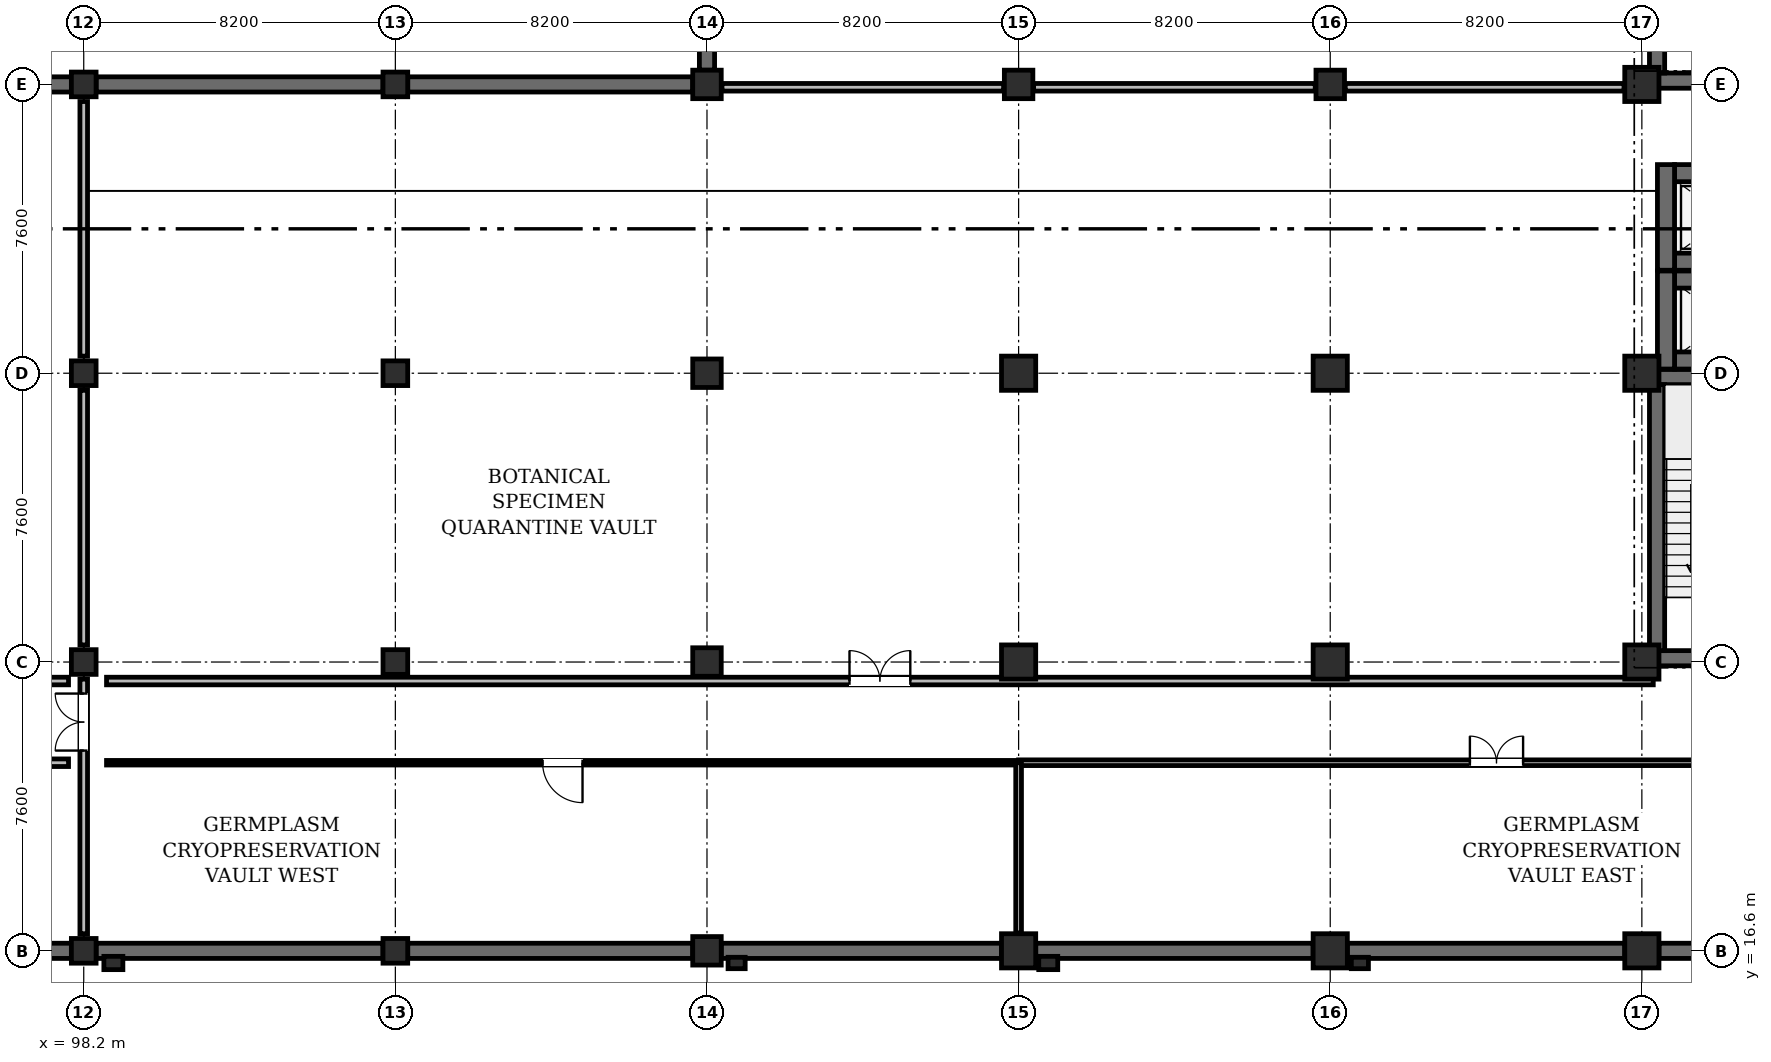
"""IFC4 building model, lengths in metres.
Left out: names, types, materials, properties, quantities, classifications, styles, units other than length and angle.
Written with IfcOpenShell. Run it as: python <this file> out.ifc"""

import sys

from ifc_helpers import new_model, si_unit, direction, frame, frame_2d, origin, origin_2d, place, context, subcontext, project, spatial, rectangle, extrude, element, fill, save


model = new_model("IFC4")
c1 = context("Model", 3, precision=1e-05, world=origin(), true_north=direction((0.0, 1.0)))
c2 = subcontext(c1, "Body", "Model", "MODEL_VIEW")
j1 = project(units=[si_unit("LENGTHUNIT", "METRE"), si_unit("PLANEANGLEUNIT", "RADIAN")], contexts=[c1])
p1 = place(None, origin())
s1 = spatial("IfcSite", under=j1, at=p1, CompositionType="ELEMENT")
p2 = place(p1, origin())
s2 = spatial("IfcBuilding", under=s1, at=p2, CompositionType="ELEMENT")
p3 = place(p2, frame((0.0, 0.0, -4.8)))
s3 = spatial("IfcBuildingStorey", under=s2, at=p3, CompositionType="ELEMENT", Elevation=-4.8)
for number, where, z_axis, x_axis in (
    (1, (98.2, 16.6, 0.0), (0.0, 0.0, 1.0), (1.0, 0.0, 0.0)),
    (2, (98.2, 24.2, 0.0), (0.0, 0.0, 1.0), (1.0, 0.0, 0.0)),
    (3, (98.2, 31.8, 0.0), (0.0, 0.0, 1.0), (1.0, 0.0, 0.0)),
    (4, (98.2, 39.4, 0.0), (0.0, 0.0, 1.0), (1.0, 0.0, 0.0)),
    (5, (106.4, 16.6, 0.0), (0.0, 0.0, 1.0), (1.0, 0.0, 0.0)),
    (6, (106.4, 24.2, 0.0), (0.0, 0.0, 1.0), (1.0, 0.0, 0.0)),
    (7, (106.4, 31.8, 0.0), (0.0, 0.0, 1.0), (1.0, 0.0, 0.0)),
    (8, (106.4, 39.4, 0.0), (0.0, 0.0, 1.0), (1.0, 0.0, 0.0)),
):
    element("IfcColumn", number, at=place(p3, frame(where, z_axis=z_axis, x_axis=x_axis)), inside=s3, PredefinedType="COLUMN", context=c2, shape_type="SweptSolid", body=[
        extrude(rectangle(XDim=0.65, YDim=0.65, at=origin_2d()), origin(), (0.0, 0.0, 1.0), 4.46),
    ])
for number, where, z_axis, x_axis in (
    (9, (114.6, 16.6, 0.0), (0.0, 0.0, 1.0), (1.0, 0.0, 0.0)),
    (10, (114.6, 24.2, 0.0), (0.0, 0.0, 1.0), (1.0, 0.0, 0.0)),
    (11, (114.6, 31.8, 0.0), (0.0, 0.0, 1.0), (1.0, 0.0, 0.0)),
    (12, (114.6, 39.4, 0.0), (0.0, 0.0, 1.0), (1.0, 0.0, 0.0)),
):
    element("IfcColumn", number, at=place(p3, frame(where, z_axis=z_axis, x_axis=x_axis)), inside=s3, PredefinedType="COLUMN", context=c2, shape_type="SweptSolid", body=[
        extrude(rectangle(XDim=0.75, YDim=0.75, at=origin_2d()), origin(), (0.0, 0.0, 1.0), 4.46),
    ])
for number, where, z_axis, x_axis in (
    (13, (122.8, 16.6, 0.0), (0.0, 0.0, 1.0), (1.0, 0.0, 0.0)),
    (14, (122.8, 24.2, 0.0), (0.0, 0.0, 1.0), (1.0, 0.0, 0.0)),
    (15, (122.8, 31.8, 0.0), (0.0, 0.0, 1.0), (1.0, 0.0, 0.0)),
):
    element("IfcColumn", number, at=place(p3, frame(where, z_axis=z_axis, x_axis=x_axis)), inside=s3, PredefinedType="COLUMN", context=c2, shape_type="SweptSolid", body=[
        extrude(rectangle(XDim=0.9, YDim=0.9, at=origin_2d()), origin(), (0.0, 0.0, 1.0), 4.46),
    ])
p4 = place(p3, frame((122.8, 39.4, 0.0), z_axis=(0.0, 0.0, 1.0), x_axis=(1.0, 0.0, 0.0)))
e16 = element("IfcColumn", 16, at=p4, inside=s3, PredefinedType="COLUMN", context=c2, shape_type="SweptSolid", body=[
    extrude(rectangle(XDim=0.75, YDim=0.75, at=origin_2d()), origin(), (0.0, 0.0, 1.0), 4.46),
])
for number, where, z_axis, x_axis in (
    (17, (131.0, 16.6, 0.0), (0.0, 0.0, 1.0), (1.0, 0.0, 0.0)),
    (18, (131.0, 24.2, 0.0), (0.0, 0.0, 1.0), (1.0, 0.0, 0.0)),
    (19, (131.0, 31.8, 0.0), (0.0, 0.0, 1.0), (1.0, 0.0, 0.0)),
):
    element("IfcColumn", number, at=place(p3, frame(where, z_axis=z_axis, x_axis=x_axis)), inside=s3, PredefinedType="COLUMN", context=c2, shape_type="SweptSolid", body=[
        extrude(rectangle(XDim=0.9, YDim=0.9, at=origin_2d()), origin(), (0.0, 0.0, 1.0), 4.46),
    ])
p5 = place(p3, frame((131.0, 39.4, 0.0), z_axis=(0.0, 0.0, 1.0), x_axis=(1.0, 0.0, 0.0)))
e20 = element("IfcColumn", 20, at=p5, inside=s3, PredefinedType="COLUMN", context=c2, shape_type="SweptSolid", body=[
    extrude(rectangle(XDim=0.75, YDim=0.75, at=origin_2d()), origin(), (0.0, 0.0, 1.0), 4.46),
])
for number, where, z_axis, x_axis in (
    (21, (139.2, 16.6, 0.0), (0.0, 0.0, 1.0), (1.0, 0.0, 0.0)),
    (22, (139.2, 24.2, 0.0), (0.0, 0.0, 1.0), (1.0, 0.0, 0.0)),
    (23, (139.2, 31.8, 0.0), (0.0, 0.0, 1.0), (1.0, 0.0, 0.0)),
    (24, (139.2, 39.4, 0.0), (0.0, 0.0, 1.0), (1.0, 0.0, 0.0)),
):
    element("IfcColumn", number, at=place(p3, frame(where, z_axis=z_axis, x_axis=x_axis)), inside=s3, PredefinedType="COLUMN", context=c2, shape_type="SweptSolid", body=[
        extrude(rectangle(XDim=0.9, YDim=0.9, at=origin_2d()), origin(), (0.0, 0.0, 1.0), 4.46),
    ])
p6 = place(p3, frame((98.98, 16.28, 0.0), z_axis=(0.0, 0.0, 1.0), x_axis=(1.0, 0.0, 0.0)))
e25 = element("IfcColumn", 25, at=p6, inside=s3, PredefinedType="PILASTER", context=c2, shape_type="SweptSolid", body=[
    extrude(rectangle(XDim=0.5, YDim=0.35, at=origin_2d()), origin(), (0.0, 0.0, 1.0), 4.565),
])
p7 = place(p3, frame((115.38, 16.28, 0.0), z_axis=(0.0, 0.0, 1.0), x_axis=(1.0, 0.0, 0.0)))
e26 = element("IfcColumn", 26, at=p7, inside=s3, PredefinedType="PILASTER", context=c2, shape_type="SweptSolid", body=[
    extrude(rectangle(XDim=0.45, YDim=0.3, at=origin_2d()), origin(), (0.0, 0.0, 1.0), 4.565),
])
p8 = place(p3, frame((123.58, 16.28, 0.0), z_axis=(0.0, 0.0, 1.0), x_axis=(1.0, 0.0, 0.0)))
e27 = element("IfcColumn", 27, at=p8, inside=s3, PredefinedType="PILASTER", context=c2, shape_type="SweptSolid", body=[
    extrude(rectangle(XDim=0.5, YDim=0.35, at=origin_2d()), origin(), (0.0, 0.0, 1.0), 4.565),
])
p9 = place(p3, frame((131.78, 16.28, 0.0), z_axis=(0.0, 0.0, 1.0), x_axis=(1.0, 0.0, 0.0)))
e28 = element("IfcColumn", 28, at=p9, inside=s3, PredefinedType="PILASTER", context=c2, shape_type="SweptSolid", body=[
    extrude(rectangle(XDim=0.45, YDim=0.3, at=origin_2d()), origin(), (0.0, 0.0, 1.0), 4.565),
])
for number, where, z_axis, x_axis in (
    (29, (90.325, 39.4, 0.0), (0.0, 0.0, 1.0), (1.0, 0.0, 0.0)),
    (30, (98.525, 39.4, 0.0), (0.0, 0.0, 1.0), (1.0, 0.0, 0.0)),
):
    element("IfcWall", number, at=place(p3, frame(where, z_axis=z_axis, x_axis=x_axis)), inside=s3, PredefinedType="SOLIDWALL", context=c2, shape_type="SweptSolid", body=[
        extrude(rectangle(XDim=7.55, YDim=0.4, at=frame_2d((3.775, 0.0))), origin(), (0.0, 0.0, 1.0), 4.46),
    ])
p10 = place(p3, frame((106.725, 39.4, 0.0), z_axis=(0.0, 0.0, 1.0), x_axis=(1.0, 0.0, 0.0)))
e31 = element("IfcWall", 31, at=p10, inside=s3, PredefinedType="SOLIDWALL", context=c2, shape_type="SweptSolid", body=[
    extrude(rectangle(XDim=7.5, YDim=0.4, at=frame_2d((3.75, 0.0))), origin(), (0.0, 0.0, 1.0), 4.46),
])
p11 = place(p3, frame((114.6, 39.775, 0.0), z_axis=(0.0, 0.0, 1.0), x_axis=(0.0, 1.0, 0.0)))
e32 = element("IfcWall", 32, at=p11, inside=s3, PredefinedType="SOLIDWALL", context=c2, shape_type="SweptSolid", body=[
    extrude(rectangle(XDim=6.85, YDim=0.4, at=frame_2d((3.425, 0.0))), origin(), (0.0, 0.0, 1.0), 4.46),
])
p12 = place(p3, frame((98.525, 16.6, 0.0), z_axis=(0.0, 0.0, 1.0), x_axis=(1.0, 0.0, 0.0)))
e33 = element("IfcWall", 33, at=p12, inside=s3, PredefinedType="SOLIDWALL", context=c2, shape_type="SweptSolid", body=[
    extrude(rectangle(XDim=7.55, YDim=0.4, at=frame_2d((3.775, 0.0))), origin(), (0.0, 0.0, 1.0), 4.46),
])
p13 = place(p3, frame((106.725, 16.6, 0.0), z_axis=(0.0, 0.0, 1.0), x_axis=(1.0, 0.0, 0.0)))
e34 = element("IfcWall", 34, at=p13, inside=s3, PredefinedType="SOLIDWALL", context=c2, shape_type="SweptSolid", body=[
    extrude(rectangle(XDim=7.5, YDim=0.4, at=frame_2d((3.75, 0.0))), origin(), (0.0, 0.0, 1.0), 4.46),
])
p14 = place(p3, frame((114.975, 16.6, 0.0), z_axis=(0.0, 0.0, 1.0), x_axis=(1.0, 0.0, 0.0)))
e35 = element("IfcWall", 35, at=p14, inside=s3, PredefinedType="SOLIDWALL", context=c2, shape_type="SweptSolid", body=[
    extrude(rectangle(XDim=7.375, YDim=0.4, at=frame_2d((3.688, 0.0))), origin(), (0.0, 0.0, 1.0), 4.46),
])
for number, where, z_axis, x_axis in (
    (36, (123.25, 16.6, 0.0), (0.0, 0.0, 1.0), (1.0, 0.0, 0.0)),
    (37, (131.45, 16.6, 0.0), (0.0, 0.0, 1.0), (1.0, 0.0, 0.0)),
    (38, (139.65, 16.6, 0.0), (0.0, 0.0, 1.0), (1.0, 0.0, 0.0)),
):
    element("IfcWall", number, at=place(p3, frame(where, z_axis=z_axis, x_axis=x_axis)), inside=s3, PredefinedType="SOLIDWALL", context=c2, shape_type="SweptSolid", body=[
        extrude(rectangle(XDim=7.3, YDim=0.4, at=frame_2d((3.65, 0.0))), origin(), (0.0, 0.0, 1.0), 4.46),
    ])
p15 = place(p3, frame((90.325, 16.6, 0.0), z_axis=(0.0, 0.0, 1.0), x_axis=(1.0, 0.0, 0.0)))
e39 = element("IfcWall", 39, at=p15, inside=s3, PredefinedType="SOLIDWALL", context=c2, shape_type="SweptSolid", body=[
    extrude(rectangle(XDim=7.55, YDim=0.4, at=frame_2d((3.775, 0.0))), origin(), (0.0, 0.0, 1.0), 4.46),
])
p16 = place(p3, frame((139.4, 24.3, 0.0), z_axis=(0.0, 0.0, 1.0), x_axis=(1.0, 0.0, 0.0)))
e40 = element("IfcWall", 40, at=p16, inside=s3, PredefinedType="SHEAR", context=c2, shape_type="SweptSolid", body=[
    extrude(rectangle(XDim=3.8, YDim=0.4, at=frame_2d((1.9, 0.0))), origin(), (0.0, 0.0, 1.0), 4.46),
])
p17 = place(p16, frame((1.3, 0.0, 0.0)))
e41 = element("IfcOpeningElement", 41, at=p17, cuts=e40, PredefinedType="OPENING", context=c2, shape_type="SweptSolid", body=[
    extrude(rectangle(XDim=1.2, YDim=2.2, at=frame_2d((0.6, 1.1))), frame((0.0, 0.212, 0.0), z_axis=(0.0, -1.0, 0.0), x_axis=(1.0, 0.0, 0.0)), (0.0, 0.0, 1.0), 0.424),
])
p18 = place(p3, frame((139.4, 31.7, 0.0), z_axis=(0.0, 0.0, 1.0), x_axis=(1.0, 0.0, 0.0)))
e42 = element("IfcWall", 42, at=p18, inside=s3, PredefinedType="SHEAR", context=c2, shape_type="SweptSolid", body=[
    extrude(rectangle(XDim=3.8, YDim=0.4, at=frame_2d((1.9, 0.0))), origin(), (0.0, 0.0, 1.0), 4.46),
])
p19 = place(p3, frame((139.6, 24.5, 0.0), z_axis=(0.0, 0.0, 1.0), x_axis=(0.0, 1.0, 0.0)))
e43 = element("IfcWall", 43, at=p19, inside=s3, PredefinedType="SHEAR", context=c2, shape_type="SweptSolid", body=[
    extrude(rectangle(XDim=7.0, YDim=0.4, at=frame_2d((3.5, 0.0))), origin(), (0.0, 0.0, 1.0), 4.46),
])
p20 = place(p3, frame((139.4, 39.5, 0.0), z_axis=(0.0, 0.0, 1.0), x_axis=(1.0, 0.0, 0.0)))
e44 = element("IfcWall", 44, at=p20, inside=s3, PredefinedType="SHEAR", context=c2, shape_type="SweptSolid", body=[
    extrude(rectangle(XDim=3.8, YDim=0.4, at=frame_2d((1.9, 0.0))), origin(), (0.0, 0.0, 1.0), 4.46),
])
p21 = place(p20, frame((1.3, 0.0, 0.0)))
e45 = element("IfcOpeningElement", 45, at=p21, cuts=e44, PredefinedType="OPENING", context=c2, shape_type="SweptSolid", body=[
    extrude(rectangle(XDim=1.2, YDim=2.2, at=frame_2d((0.6, 1.1))), frame((0.0, 0.212, 0.0), z_axis=(0.0, -1.0, 0.0), x_axis=(1.0, 0.0, 0.0)), (0.0, 0.0, 1.0), 0.424),
])
p22 = place(p3, frame((139.6, 39.7, 0.0), z_axis=(0.0, 0.0, 1.0), x_axis=(0.0, 1.0, 0.0)))
e46 = element("IfcWall", 46, at=p22, inside=s3, PredefinedType="SHEAR", context=c2, shape_type="SweptSolid", body=[
    extrude(rectangle(XDim=7.0, YDim=0.4, at=frame_2d((3.5, 0.0))), origin(), (0.0, 0.0, 1.0), 4.46),
])
for number, where, z_axis, x_axis in (
    (47, (140.06, 32.135, 0.0), (0.0, 0.0, 1.0), (1.0, 0.0, 0.0)),
    (48, (140.06, 34.265, 0.0), (0.0, 0.0, 1.0), (1.0, 0.0, 0.0)),
):
    element("IfcWall", number, at=place(p3, frame(where, z_axis=z_axis, x_axis=x_axis)), inside=s3, PredefinedType="SHEAR", context=c2, shape_type="SweptSolid", body=[
        extrude(rectangle(XDim=2.74, YDim=0.45, at=frame_2d((1.37, 0.0))), origin(), (0.0, 0.0, 1.0), 4.46),
    ])
p23 = place(p3, frame((139.835, 31.91, 0.0), z_axis=(0.0, 0.0, 1.0), x_axis=(0.0, 1.0, 0.0)))
e49 = element("IfcWall", 49, at=p23, inside=s3, PredefinedType="SHEAR", context=c2, shape_type="SweptSolid", body=[
    extrude(rectangle(XDim=2.58, YDim=0.45, at=frame_2d((1.29, 0.0))), origin(), (0.0, 0.0, 1.0), 4.46),
])
for number, where, z_axis, x_axis in (
    (50, (140.06, 34.735, 0.0), (0.0, 0.0, 1.0), (1.0, 0.0, 0.0)),
    (51, (140.06, 37.065, 0.0), (0.0, 0.0, 1.0), (1.0, 0.0, 0.0)),
):
    element("IfcWall", number, at=place(p3, frame(where, z_axis=z_axis, x_axis=x_axis)), inside=s3, PredefinedType="SHEAR", context=c2, shape_type="SweptSolid", body=[
        extrude(rectangle(XDim=2.74, YDim=0.45, at=frame_2d((1.37, 0.0))), origin(), (0.0, 0.0, 1.0), 4.46),
    ])
p24 = place(p3, frame((139.835, 34.51, 0.0), z_axis=(0.0, 0.0, 1.0), x_axis=(0.0, 1.0, 0.0)))
e52 = element("IfcWall", 52, at=p24, inside=s3, PredefinedType="SHEAR", context=c2, shape_type="SweptSolid", body=[
    extrude(rectangle(XDim=2.78, YDim=0.45, at=frame_2d((1.39, 0.0))), origin(), (0.0, 0.0, 1.0), 4.46),
])
p25 = place(p3, frame((98.2, 17.05, 0.0), z_axis=(0.0, 0.0, 1.0), x_axis=(0.0, 1.0, 0.0)))
e53 = element("IfcWall", 53, at=p25, inside=s3, PredefinedType="PARTITIONING", context=c2, shape_type="SweptSolid", body=[
    extrude(rectangle(XDim=6.7, YDim=0.2, at=frame_2d((3.35, 0.0))), origin(), (0.0, 0.0, 1.0), 3.595),
])
p26 = place(p25, frame((4.82, 0.0, 0.0)))
e54 = element("IfcOpeningElement", 54, at=p26, cuts=e53, PredefinedType="OPENING", context=c2, shape_type="SweptSolid", body=[
    extrude(rectangle(XDim=1.5, YDim=2.2, at=frame_2d((0.75, 1.1))), frame((0.0, 0.112, 0.0), z_axis=(0.0, -1.0, 0.0), x_axis=(1.0, 0.0, 0.0)), (0.0, 0.0, 1.0), 0.224),
])
p27 = place(p3, frame((98.2, 24.65, 0.0), z_axis=(0.0, 0.0, 1.0), x_axis=(0.0, 1.0, 0.0)))
e55 = element("IfcWall", 55, at=p27, inside=s3, PredefinedType="PARTITIONING", context=c2, shape_type="SweptSolid", body=[
    extrude(rectangle(XDim=6.7, YDim=0.2, at=frame_2d((3.35, 0.0))), origin(), (0.0, 0.0, 1.0), 3.595),
])
p28 = place(p3, frame((98.2, 32.25, 0.0), z_axis=(0.0, 0.0, 1.0), x_axis=(0.0, 1.0, 0.0)))
e56 = element("IfcWall", 56, at=p28, inside=s3, PredefinedType="PARTITIONING", context=c2, shape_type="SweptSolid", body=[
    extrude(rectangle(XDim=6.7, YDim=0.2, at=frame_2d((3.35, 0.0))), origin(), (0.0, 0.0, 1.0), 3.595),
])
p29 = place(p3, frame((122.8, 21.55, 0.0), z_axis=(0.0, 0.0, 1.0), x_axis=(-1.0, 0.0, 0.0)))
e57 = element("IfcWall", 57, at=p29, inside=s3, PredefinedType="PARTITIONING", context=c2, shape_type="SweptSolid", body=[
    extrude(rectangle(XDim=24.0, YDim=0.12, at=frame_2d((12.0, 0.0))), origin(), (0.0, 0.0, 1.0), 3.885),
])
p30 = place(p29, frame((11.475, 0.0, 0.0)))
e58 = element("IfcOpeningElement", 58, at=p30, cuts=e57, PredefinedType="OPENING", context=c2, shape_type="SweptSolid", body=[
    extrude(rectangle(XDim=1.05, YDim=2.2, at=frame_2d((0.525, 1.1))), frame((0.0, 0.072, 0.0), z_axis=(0.0, -1.0, 0.0), x_axis=(1.0, 0.0, 0.0)), (0.0, 0.0, 1.0), 0.144),
])
p31 = place(p3, frame((147.95, 21.55, 0.0), z_axis=(0.0, 0.0, 1.0), x_axis=(-1.0, 0.0, 0.0)))
e59 = element("IfcWall", 59, at=p31, inside=s3, PredefinedType="PARTITIONING", context=c2, shape_type="SweptSolid", body=[
    extrude(rectangle(XDim=25.15, YDim=0.15, at=frame_2d((12.575, 0.0))), origin(), (0.0, 0.0, 1.0), 4.035),
])
p32 = place(p31, frame((11.875, 0.0, 0.0)))
e60 = element("IfcOpeningElement", 60, at=p32, cuts=e59, PredefinedType="OPENING", context=c2, shape_type="SweptSolid", body=[
    extrude(rectangle(XDim=1.4, YDim=2.2, at=frame_2d((0.7, 1.1))), frame((0.0, 0.087, 0.0), z_axis=(0.0, -1.0, 0.0), x_axis=(1.0, 0.0, 0.0)), (0.0, 0.0, 1.0), 0.174),
])
p33 = place(p3, frame((98.8, 23.7, 0.0), z_axis=(0.0, 0.0, 1.0), x_axis=(1.0, 0.0, 0.0)))
e61 = element("IfcWall", 61, at=p33, inside=s3, PredefinedType="PARTITIONING", context=c2, shape_type="SweptSolid", body=[
    extrude(rectangle(XDim=40.7, YDim=0.2, at=frame_2d((20.35, 0.0))), origin(), (0.0, 0.0, 1.0), 4.405),
])
p34 = place(p33, frame((19.55, 0.0, 0.0)))
e62 = element("IfcOpeningElement", 62, at=p34, cuts=e61, PredefinedType="OPENING", context=c2, shape_type="SweptSolid", body=[
    extrude(rectangle(XDim=1.6, YDim=2.3, at=frame_2d((0.8, 1.15))), frame((0.0, 0.112, 0.0), z_axis=(0.0, -1.0, 0.0), x_axis=(1.0, 0.0, 0.0)), (0.0, 0.0, 1.0), 0.224),
])
p35 = place(p3, frame((122.8, 21.55, 0.0), z_axis=(0.0, 0.0, 1.0), x_axis=(0.0, -1.0, 0.0)))
e63 = element("IfcWall", 63, at=p35, inside=s3, PredefinedType="PARTITIONING", context=c2, shape_type="SweptSolid", body=[
    extrude(rectangle(XDim=4.48, YDim=0.15, at=frame_2d((2.24, 0.0))), origin(), (0.0, 0.0, 1.0), 3.595),
])
for number, where, z_axis, x_axis in (
    (64, (114.995, 39.325, 0.0), (0.0, 0.0, 1.0), (1.0, 0.0, 0.0)),
    (65, (123.195, 39.325, 0.0), (0.0, 0.0, 1.0), (1.0, 0.0, 0.0)),
):
    element("IfcWall", number, at=place(p3, frame(where, z_axis=z_axis, x_axis=x_axis)), inside=s3, PredefinedType="PARTITIONING", context=c2, shape_type="SweptSolid", body=[
        extrude(rectangle(XDim=7.41, YDim=0.2, at=frame_2d((3.705, 0.0))), origin(), (0.0, 0.0, 1.0), 3.595),
    ])
p36 = place(p3, frame((131.395, 39.325, 0.0), z_axis=(0.0, 0.0, 1.0), x_axis=(1.0, 0.0, 0.0)))
e66 = element("IfcWall", 66, at=p36, inside=s3, PredefinedType="PARTITIONING", context=c2, shape_type="SweptSolid", body=[
    extrude(rectangle(XDim=7.335, YDim=0.2, at=frame_2d((3.667, 0.0))), origin(), (0.0, 0.0, 1.0), 3.595),
])
p37 = place(p3, frame((78.0, 23.7, 0.0), z_axis=(0.0, 0.0, 1.0), x_axis=(1.0, 0.0, 0.0)))
e67 = element("IfcWall", 67, at=p37, inside=s3, PredefinedType="PARTITIONING", context=c2, shape_type="SweptSolid", body=[
    extrude(rectangle(XDim=19.8, YDim=0.2, at=frame_2d((9.9, 0.0))), origin(), (0.0, 0.0, 1.0), 4.405),
])
p38 = place(p37, frame((9.15, 0.0, 0.0)))
e68 = element("IfcOpeningElement", 68, at=p38, cuts=e67, PredefinedType="OPENING", context=c2, shape_type="SweptSolid", body=[
    extrude(rectangle(XDim=1.5, YDim=2.2, at=frame_2d((0.75, 1.1))), frame((0.0, 0.112, 0.0), z_axis=(0.0, -1.0, 0.0), x_axis=(1.0, 0.0, 0.0)), (0.0, 0.0, 1.0), 0.224),
])
p39 = place(p3, frame((97.8, 21.55, 0.0), z_axis=(0.0, 0.0, 1.0), x_axis=(-1.0, 0.0, 0.0)))
e69 = element("IfcWall", 69, at=p39, inside=s3, PredefinedType="PARTITIONING", context=c2, shape_type="SweptSolid", body=[
    extrude(rectangle(XDim=40.2, YDim=0.2, at=frame_2d((20.1, 0.0))), origin(), (0.0, 0.0, 1.0), 4.405),
])
p40 = place(p39, frame((19.35, 0.0, 0.0)))
e70 = element("IfcOpeningElement", 70, at=p40, cuts=e69, PredefinedType="OPENING", context=c2, shape_type="SweptSolid", body=[
    extrude(rectangle(XDim=1.5, YDim=2.2, at=frame_2d((0.75, 1.1))), frame((0.0, 0.112, 0.0), z_axis=(0.0, -1.0, 0.0), x_axis=(1.0, 0.0, 0.0)), (0.0, 0.0, 1.0), 0.224),
])
p41 = place(p26, origin())
e71 = element("IfcDoor", 71, at=p41, inside=s3, OperationType="DOUBLE_DOOR_SINGLE_SWING", PredefinedType="DOOR", context=c2, shape_type="SweptSolid", body=[
    extrude(rectangle(XDim=1.5, YDim=2.2, at=frame_2d((0.75, 1.1))), frame((0.0, 0.025, 0.0), z_axis=(0.0, -1.0, 0.0), x_axis=(1.0, 0.0, 0.0)), (0.0, 0.0, 1.0), 0.05),
])
fill(e54, e71)
p42 = place(p30, origin())
e72 = element("IfcDoor", 72, at=p42, inside=s3, OperationType="SINGLE_SWING_LEFT", PredefinedType="DOOR", context=c2, shape_type="SweptSolid", body=[
    extrude(rectangle(XDim=1.05, YDim=2.2, at=frame_2d((0.525, 1.1))), frame((0.0, 0.025, 0.0), z_axis=(0.0, -1.0, 0.0), x_axis=(1.0, 0.0, 0.0)), (0.0, 0.0, 1.0), 0.05),
])
fill(e58, e72)
p43 = place(p32, frame((1.4, 0.0, 0.0), z_axis=(0.0, 0.0, 1.0), x_axis=(-1.0, 0.0, 0.0)))
e73 = element("IfcDoor", 73, at=p43, inside=s3, OperationType="DOUBLE_DOOR_SINGLE_SWING", PredefinedType="DOOR", context=c2, shape_type="SweptSolid", body=[
    extrude(rectangle(XDim=1.4, YDim=2.2, at=frame_2d((0.7, 1.1))), frame((0.0, 0.025, 0.0), z_axis=(0.0, -1.0, 0.0), x_axis=(1.0, 0.0, 0.0)), (0.0, 0.0, 1.0), 0.05),
])
fill(e60, e73)
p44 = place(p34, origin())
e74 = element("IfcDoor", 74, at=p44, inside=s3, OperationType="DOUBLE_DOOR_SINGLE_SWING", PredefinedType="DOOR", context=c2, shape_type="SweptSolid", body=[
    extrude(rectangle(XDim=1.6, YDim=2.3, at=frame_2d((0.8, 1.15))), frame((0.0, 0.025, 0.0), z_axis=(0.0, -1.0, 0.0), x_axis=(1.0, 0.0, 0.0)), (0.0, 0.0, 1.0), 0.05),
])
fill(e62, e74)
save(model, sys.argv[1])
